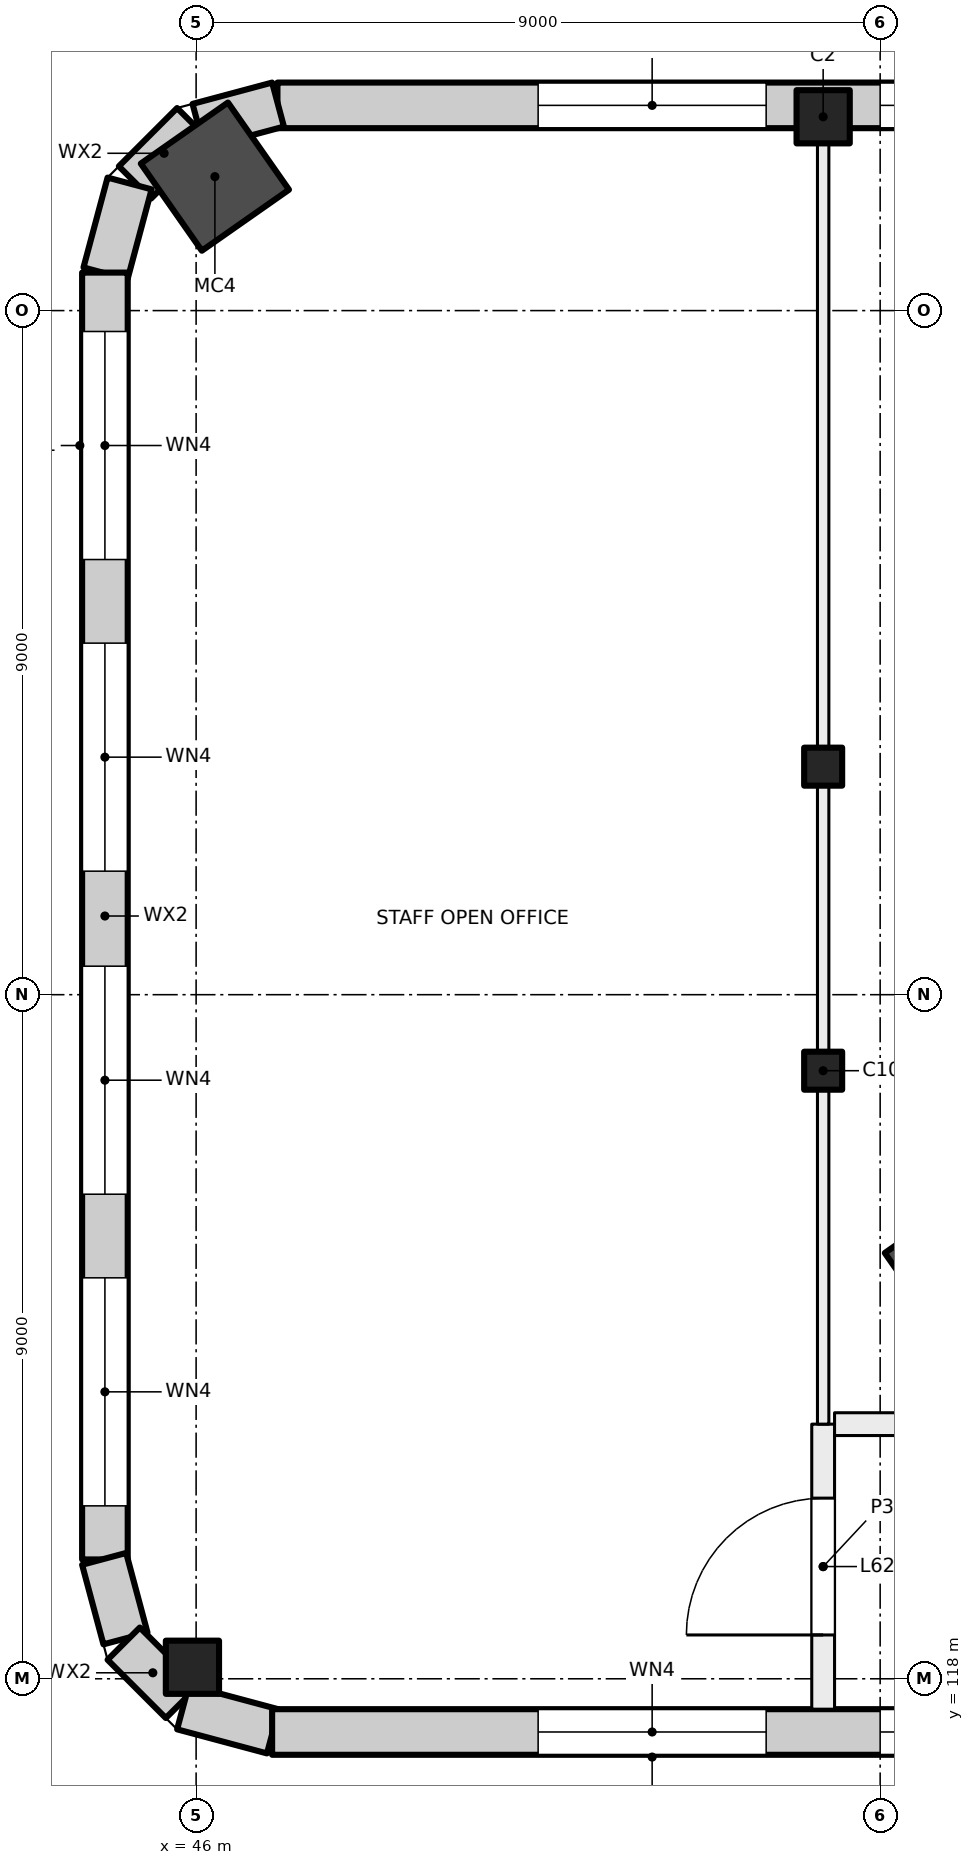
"""IFC4 building model, lengths in metres.
Left out: names, types, materials, properties, quantities, classifications, styles, units other than length and angle.
Written with IfcOpenShell. Run it as: python <this file> out.ifc"""

import sys

from ifc_helpers import new_model, si_unit, direction, frame, frame_2d, origin, origin_2d, place, context, subcontext, project, spatial, rectangle, hollow_rectangle, extrude, element, fill, save


model = new_model("IFC4")
c1 = context("Model", 3, precision=1e-05, world=origin(), true_north=direction((0.0, 1.0)))
c2 = subcontext(c1, "Body", "Model", "MODEL_VIEW")
j1 = project(units=[si_unit("LENGTHUNIT", "METRE"), si_unit("PLANEANGLEUNIT", "RADIAN")], contexts=[c1])
p1 = place(None, origin())
s1 = spatial("IfcSite", under=j1, at=p1, CompositionType="ELEMENT")
p2 = place(p1, origin())
s2 = spatial("IfcBuilding", under=s1, at=p2, CompositionType="ELEMENT")
p3 = place(p2, frame((0.0, 0.0, 261.5)))
s3 = spatial("IfcBuildingStorey", under=s2, at=p3, CompositionType="ELEMENT", Elevation=261.5)
for number, where, z_axis, x_axis in (
    (1, (46.247, 137.762, 0.0), (0.0, 0.0, 1.0), (0.574, -0.819, 0.0)),
    (2, (56.036, 123.43, 0.0), (0.0, 0.0, 1.0), (0.574, -0.819, 0.0)),
):
    element("IfcColumn", number, at=place(p3, frame(where, z_axis=z_axis, x_axis=x_axis)), inside=s3, PredefinedType="COLUMN", context=c2, shape_type="SweptSolid", body=[
        extrude(hollow_rectangle(XDim=1.4, YDim=1.4, WallThickness=0.025, at=origin_2d()), origin(), (0.0, 0.0, 1.0), 4.0),
    ])
for number, where, z_axis, x_axis in (
    (3, (54.25, 130.0, 0.0), (0.0, 0.0, 1.0), (1.0, 0.0, 0.0)),
    (4, (54.25, 126.0, 0.0), (0.0, 0.0, 1.0), (1.0, 0.0, 0.0)),
):
    element("IfcColumn", number, at=place(p3, frame(where, z_axis=z_axis, x_axis=x_axis)), inside=s3, PredefinedType="COLUMN", context=c2, shape_type="SweptSolid", body=[
        extrude(rectangle(XDim=0.5, YDim=0.5, at=origin_2d()), origin(), (0.0, 0.0, 1.0), 4.0),
    ])
for number, where, z_axis, x_axis in (
    (5, (54.25, 138.55, 0.0), (0.0, 0.0, 1.0), (1.0, 0.0, 0.0)),
    (6, (45.952, 118.152, 0.0), (0.0, 0.0, 1.0), (1.0, 0.0, 0.0)),
):
    element("IfcColumn", number, at=place(p3, frame(where, z_axis=z_axis, x_axis=x_axis)), inside=s3, PredefinedType="COLUMN", context=c2, shape_type="SweptSolid", body=[
        extrude(rectangle(XDim=0.7, YDim=0.7, at=origin_2d()), origin(), (0.0, 0.0, 1.0), 4.0),
    ])
p4 = place(p3, frame((47.07, 138.7, 0.0), z_axis=(0.0, 0.0, 1.0), x_axis=(1.0, 0.0, 0.0)))
e7 = element("IfcWall", 7, at=p4, inside=s3, PredefinedType="SOLIDWALL", context=c2, shape_type="SweptSolid", body=[
    extrude(rectangle(XDim=43.91, YDim=0.6, at=frame_2d((21.955, 0.0))), origin(), (0.0, 0.0, 1.0), 3.625),
])
p5 = place(p4, frame((3.43, 0.0, 0.9)))
e8 = element("IfcOpeningElement", 8, at=p5, cuts=e7, PredefinedType="OPENING", context=c2, shape_type="SweptSolid", body=[
    extrude(rectangle(XDim=3.0, YDim=2.4, at=frame_2d((1.5, 1.2))), frame((0.0, 0.31, 0.0), z_axis=(0.0, -1.0, 0.0), x_axis=(1.0, 0.0, 0.0)), (0.0, 0.0, 1.0), 0.62),
])
p6 = place(p4, frame((7.93, 0.0, 0.9)))
e9 = element("IfcOpeningElement", 9, at=p6, cuts=e7, PredefinedType="OPENING", context=c2, shape_type="SweptSolid", body=[
    extrude(rectangle(XDim=3.0, YDim=2.4, at=frame_2d((1.5, 1.2))), frame((0.0, 0.31, 0.0), z_axis=(0.0, -1.0, 0.0), x_axis=(1.0, 0.0, 0.0)), (0.0, 0.0, 1.0), 0.62),
])
p7 = place(p4, frame((12.43, 0.0, 0.9)))
e10 = element("IfcOpeningElement", 10, at=p7, cuts=e7, PredefinedType="OPENING", context=c2, shape_type="SweptSolid", body=[
    extrude(rectangle(XDim=3.0, YDim=2.4, at=frame_2d((1.5, 1.2))), frame((0.0, 0.31, 0.0), z_axis=(0.0, -1.0, 0.0), x_axis=(1.0, 0.0, 0.0)), (0.0, 0.0, 1.0), 0.62),
])
p8 = place(p4, frame((16.93, 0.0, 0.9)))
e11 = element("IfcOpeningElement", 11, at=p8, cuts=e7, PredefinedType="OPENING", context=c2, shape_type="SweptSolid", body=[
    extrude(rectangle(XDim=3.0, YDim=2.4, at=frame_2d((1.5, 1.2))), frame((0.0, 0.31, 0.0), z_axis=(0.0, -1.0, 0.0), x_axis=(1.0, 0.0, 0.0)), (0.0, 0.0, 1.0), 0.62),
])
p9 = place(p4, frame((21.43, 0.0, 0.9)))
e12 = element("IfcOpeningElement", 12, at=p9, cuts=e7, PredefinedType="OPENING", context=c2, shape_type="SweptSolid", body=[
    extrude(rectangle(XDim=3.0, YDim=2.4, at=frame_2d((1.5, 1.2))), frame((0.0, 0.31, 0.0), z_axis=(0.0, -1.0, 0.0), x_axis=(1.0, 0.0, 0.0)), (0.0, 0.0, 1.0), 0.62),
])
p10 = place(p4, frame((25.93, 0.0, 0.9)))
e13 = element("IfcOpeningElement", 13, at=p10, cuts=e7, PredefinedType="OPENING", context=c2, shape_type="SweptSolid", body=[
    extrude(rectangle(XDim=3.0, YDim=2.4, at=frame_2d((1.5, 1.2))), frame((0.0, 0.31, 0.0), z_axis=(0.0, -1.0, 0.0), x_axis=(1.0, 0.0, 0.0)), (0.0, 0.0, 1.0), 0.62),
])
p11 = place(p4, frame((30.43, 0.0, 0.9)))
e14 = element("IfcOpeningElement", 14, at=p11, cuts=e7, PredefinedType="OPENING", context=c2, shape_type="SweptSolid", body=[
    extrude(rectangle(XDim=3.0, YDim=2.4, at=frame_2d((1.5, 1.2))), frame((0.0, 0.31, 0.0), z_axis=(0.0, -1.0, 0.0), x_axis=(1.0, 0.0, 0.0)), (0.0, 0.0, 1.0), 0.62),
])
p12 = place(p4, frame((34.93, 0.0, 0.9)))
e15 = element("IfcOpeningElement", 15, at=p12, cuts=e7, PredefinedType="OPENING", context=c2, shape_type="SweptSolid", body=[
    extrude(rectangle(XDim=3.0, YDim=2.4, at=frame_2d((1.5, 1.2))), frame((0.0, 0.31, 0.0), z_axis=(0.0, -1.0, 0.0), x_axis=(1.0, 0.0, 0.0)), (0.0, 0.0, 1.0), 0.62),
])
p13 = place(p4, frame((39.43, 0.0, 0.9)))
e16 = element("IfcOpeningElement", 16, at=p13, cuts=e7, PredefinedType="OPENING", context=c2, shape_type="SweptSolid", body=[
    extrude(rectangle(XDim=3.0, YDim=2.4, at=frame_2d((1.5, 1.2))), frame((0.0, 0.31, 0.0), z_axis=(0.0, -1.0, 0.0), x_axis=(1.0, 0.0, 0.0)), (0.0, 0.0, 1.0), 0.62),
])
p14 = place(p3, frame((46.031, 138.43, 0.0), z_axis=(0.0, 0.0, 1.0), x_axis=(0.965939004864, 0.25876985698, 0.0)))
e17 = element("IfcWall", 17, at=p14, inside=s3, PredefinedType="SOLIDWALL", context=c2, shape_type="SweptSolid", body=[
    extrude(rectangle(XDim=1.084, YDim=0.6, at=frame_2d((0.542, 0.0))), origin(), (0.0, 0.0, 1.0), 3.625),
])
p15 = place(p3, frame((45.196, 137.686, 0.0), z_axis=(0.0, 0.0, 1.0), x_axis=(0.707106781187, 0.707106781187, 0.0)))
e18 = element("IfcWall", 18, at=p15, inside=s3, PredefinedType="SOLIDWALL", context=c2, shape_type="SweptSolid", body=[
    extrude(rectangle(XDim=1.084, YDim=0.6, at=frame_2d((0.542, 0.0))), origin(), (0.0, 0.0, 1.0), 3.625),
])
p16 = place(p3, frame((44.808, 136.49, 0.0), z_axis=(0.0, 0.0, 1.0), x_axis=(0.258878975098, 0.965909766102, 0.0)))
e19 = element("IfcWall", 19, at=p16, inside=s3, PredefinedType="SOLIDWALL", context=c2, shape_type="SweptSolid", body=[
    extrude(rectangle(XDim=1.224, YDim=0.6, at=frame_2d((0.612, 0.0))), origin(), (0.0, 0.0, 1.0), 3.625),
])
p17 = place(p3, frame((44.8, 119.57, 0.0), z_axis=(0.0, 0.0, 1.0), x_axis=(0.0, 1.0, 0.0)))
e20 = element("IfcWall", 20, at=p17, inside=s3, PredefinedType="SOLIDWALL", context=c2, shape_type="SweptSolid", body=[
    extrude(rectangle(XDim=16.93, YDim=0.6, at=frame_2d((8.465, 0.0))), origin(), (0.0, 0.0, 1.0), 3.625),
])
p18 = place(p17, frame((0.705, 0.0, 0.9)))
e21 = element("IfcOpeningElement", 21, at=p18, cuts=e20, PredefinedType="OPENING", context=c2, shape_type="SweptSolid", body=[
    extrude(rectangle(XDim=3.0, YDim=2.4, at=frame_2d((1.5, 1.2))), frame((0.0, 0.31, 0.0), z_axis=(0.0, -1.0, 0.0), x_axis=(1.0, 0.0, 0.0)), (0.0, 0.0, 1.0), 0.62),
])
p19 = place(p17, frame((4.805, 0.0, 0.9)))
e22 = element("IfcOpeningElement", 22, at=p19, cuts=e20, PredefinedType="OPENING", context=c2, shape_type="SweptSolid", body=[
    extrude(rectangle(XDim=3.0, YDim=2.4, at=frame_2d((1.5, 1.2))), frame((0.0, 0.31, 0.0), z_axis=(0.0, -1.0, 0.0), x_axis=(1.0, 0.0, 0.0)), (0.0, 0.0, 1.0), 0.62),
])
p20 = place(p17, frame((9.055, 0.0, 0.9)))
e23 = element("IfcOpeningElement", 23, at=p20, cuts=e20, PredefinedType="OPENING", context=c2, shape_type="SweptSolid", body=[
    extrude(rectangle(XDim=3.0, YDim=2.4, at=frame_2d((1.5, 1.2))), frame((0.0, 0.31, 0.0), z_axis=(0.0, -1.0, 0.0), x_axis=(1.0, 0.0, 0.0)), (0.0, 0.0, 1.0), 0.62),
])
p21 = place(p17, frame((13.155, 0.0, 0.9)))
e24 = element("IfcOpeningElement", 24, at=p21, cuts=e20, PredefinedType="OPENING", context=c2, shape_type="SweptSolid", body=[
    extrude(rectangle(XDim=3.0, YDim=2.4, at=frame_2d((1.5, 1.2))), frame((0.0, 0.31, 0.0), z_axis=(0.0, -1.0, 0.0), x_axis=(1.0, 0.0, 0.0)), (0.0, 0.0, 1.0), 0.62),
])
p22 = place(p3, frame((45.07, 118.531, 0.0), z_axis=(0.0, 0.0, 1.0), x_axis=(-0.25876985698, 0.965939004864, 0.0)))
e25 = element("IfcWall", 25, at=p22, inside=s3, PredefinedType="SOLIDWALL", context=c2, shape_type="SweptSolid", body=[
    extrude(rectangle(XDim=1.084, YDim=0.6, at=frame_2d((0.542, 0.0))), origin(), (0.0, 0.0, 1.0), 3.625),
])
p23 = place(p3, frame((45.814, 117.696, 0.0), z_axis=(0.0, 0.0, 1.0), x_axis=(-0.707106781187, 0.707106781187, 0.0)))
e26 = element("IfcWall", 26, at=p23, inside=s3, PredefinedType="SOLIDWALL", context=c2, shape_type="SweptSolid", body=[
    extrude(rectangle(XDim=1.084, YDim=0.6, at=frame_2d((0.542, 0.0))), origin(), (0.0, 0.0, 1.0), 3.625),
])
p24 = place(p3, frame((47.01, 117.308, 0.0), z_axis=(0.0, 0.0, 1.0), x_axis=(-0.965909766102, 0.258878975098, 0.0)))
e27 = element("IfcWall", 27, at=p24, inside=s3, PredefinedType="SOLIDWALL", context=c2, shape_type="SweptSolid", body=[
    extrude(rectangle(XDim=1.224, YDim=0.6, at=frame_2d((0.612, 0.0))), origin(), (0.0, 0.0, 1.0), 3.625),
])
p25 = place(p3, frame((90.98, 117.3, 0.0), z_axis=(0.0, 0.0, 1.0), x_axis=(-1.0, 0.0, 0.0)))
e28 = element("IfcWall", 28, at=p25, inside=s3, PredefinedType="SOLIDWALL", context=c2, shape_type="SweptSolid", body=[
    extrude(rectangle(XDim=43.98, YDim=0.6, at=frame_2d((21.99, 0.0))), origin(), (0.0, 0.0, 1.0), 3.625),
])
p26 = place(p25, frame((1.48, 0.0, 0.9)))
e29 = element("IfcOpeningElement", 29, at=p26, cuts=e28, PredefinedType="OPENING", context=c2, shape_type="SweptSolid", body=[
    extrude(rectangle(XDim=3.0, YDim=2.4, at=frame_2d((1.5, 1.2))), frame((0.0, 0.31, 0.0), z_axis=(0.0, -1.0, 0.0), x_axis=(1.0, 0.0, 0.0)), (0.0, 0.0, 1.0), 0.62),
])
p27 = place(p25, frame((5.98, 0.0, 0.9)))
e30 = element("IfcOpeningElement", 30, at=p27, cuts=e28, PredefinedType="OPENING", context=c2, shape_type="SweptSolid", body=[
    extrude(rectangle(XDim=3.0, YDim=2.4, at=frame_2d((1.5, 1.2))), frame((0.0, 0.31, 0.0), z_axis=(0.0, -1.0, 0.0), x_axis=(1.0, 0.0, 0.0)), (0.0, 0.0, 1.0), 0.62),
])
p28 = place(p25, frame((10.48, 0.0, 0.9)))
e31 = element("IfcOpeningElement", 31, at=p28, cuts=e28, PredefinedType="OPENING", context=c2, shape_type="SweptSolid", body=[
    extrude(rectangle(XDim=3.0, YDim=2.4, at=frame_2d((1.5, 1.2))), frame((0.0, 0.31, 0.0), z_axis=(0.0, -1.0, 0.0), x_axis=(1.0, 0.0, 0.0)), (0.0, 0.0, 1.0), 0.62),
])
p29 = place(p25, frame((14.98, 0.0, 0.9)))
e32 = element("IfcOpeningElement", 32, at=p29, cuts=e28, PredefinedType="OPENING", context=c2, shape_type="SweptSolid", body=[
    extrude(rectangle(XDim=3.0, YDim=2.4, at=frame_2d((1.5, 1.2))), frame((0.0, 0.31, 0.0), z_axis=(0.0, -1.0, 0.0), x_axis=(1.0, 0.0, 0.0)), (0.0, 0.0, 1.0), 0.62),
])
p30 = place(p25, frame((19.48, 0.0, 0.9)))
e33 = element("IfcOpeningElement", 33, at=p30, cuts=e28, PredefinedType="OPENING", context=c2, shape_type="SweptSolid", body=[
    extrude(rectangle(XDim=3.0, YDim=2.4, at=frame_2d((1.5, 1.2))), frame((0.0, 0.31, 0.0), z_axis=(0.0, -1.0, 0.0), x_axis=(1.0, 0.0, 0.0)), (0.0, 0.0, 1.0), 0.62),
])
p31 = place(p25, frame((23.98, 0.0, 0.9)))
e34 = element("IfcOpeningElement", 34, at=p31, cuts=e28, PredefinedType="OPENING", context=c2, shape_type="SweptSolid", body=[
    extrude(rectangle(XDim=3.0, YDim=2.4, at=frame_2d((1.5, 1.2))), frame((0.0, 0.31, 0.0), z_axis=(0.0, -1.0, 0.0), x_axis=(1.0, 0.0, 0.0)), (0.0, 0.0, 1.0), 0.62),
])
p32 = place(p25, frame((28.48, 0.0, 0.9)))
e35 = element("IfcOpeningElement", 35, at=p32, cuts=e28, PredefinedType="OPENING", context=c2, shape_type="SweptSolid", body=[
    extrude(rectangle(XDim=3.0, YDim=2.4, at=frame_2d((1.5, 1.2))), frame((0.0, 0.31, 0.0), z_axis=(0.0, -1.0, 0.0), x_axis=(1.0, 0.0, 0.0)), (0.0, 0.0, 1.0), 0.62),
])
p33 = place(p25, frame((32.98, 0.0, 0.9)))
e36 = element("IfcOpeningElement", 36, at=p33, cuts=e28, PredefinedType="OPENING", context=c2, shape_type="SweptSolid", body=[
    extrude(rectangle(XDim=3.0, YDim=2.4, at=frame_2d((1.5, 1.2))), frame((0.0, 0.31, 0.0), z_axis=(0.0, -1.0, 0.0), x_axis=(1.0, 0.0, 0.0)), (0.0, 0.0, 1.0), 0.62),
])
p34 = place(p25, frame((37.48, 0.0, 0.9)))
e37 = element("IfcOpeningElement", 37, at=p34, cuts=e28, PredefinedType="OPENING", context=c2, shape_type="SweptSolid", body=[
    extrude(rectangle(XDim=3.0, YDim=2.4, at=frame_2d((1.5, 1.2))), frame((0.0, 0.31, 0.0), z_axis=(0.0, -1.0, 0.0), x_axis=(1.0, 0.0, 0.0)), (0.0, 0.0, 1.0), 0.62),
])
p35 = place(p3, frame((54.25, 117.6, 0.0), z_axis=(0.0, 0.0, 1.0), x_axis=(0.0, 1.0, 0.0)))
e38 = element("IfcWall", 38, at=p35, inside=s3, PredefinedType="PARTITIONING", context=c2, shape_type="SweptSolid", body=[
    extrude(rectangle(XDim=3.75, YDim=0.3, at=frame_2d((1.875, 0.0))), origin(), (0.0, 0.0, 1.0), 3.625),
])
p36 = place(p35, frame((0.977, 0.0, 0.0)))
e39 = element("IfcOpeningElement", 39, at=p36, cuts=e38, PredefinedType="OPENING", context=c2, shape_type="SweptSolid", body=[
    extrude(rectangle(XDim=1.8, YDim=2.1, at=frame_2d((0.9, 1.05))), frame((0.0, 0.16, 0.0), z_axis=(0.0, -1.0, 0.0), x_axis=(1.0, 0.0, 0.0)), (0.0, 0.0, 1.0), 0.32),
])
p37 = place(p3, frame((54.4, 121.35, 0.0), z_axis=(0.0, 0.0, 1.0), x_axis=(1.0, 0.0, 0.0)))
e40 = element("IfcWall", 40, at=p37, inside=s3, PredefinedType="PARTITIONING", context=c2, shape_type="SweptSolid", body=[
    extrude(rectangle(XDim=31.438, YDim=0.3, at=frame_2d((15.719, 0.0))), origin(), (0.0, 0.0, 1.0), 3.625),
])
p38 = place(p37, frame((21.85, 0.0, 0.0)))
e41 = element("IfcOpeningElement", 41, at=p38, cuts=e40, PredefinedType="OPENING", context=c2, shape_type="SweptSolid", body=[
    extrude(rectangle(XDim=1.0, YDim=2.1, at=frame_2d((0.5, 1.05))), frame((0.0, 0.16, 0.0), z_axis=(0.0, -1.0, 0.0), x_axis=(1.0, 0.0, 0.0)), (0.0, 0.0, 1.0), 0.32),
])
p39 = place(p37, frame((12.75, 0.0, 0.0)))
e42 = element("IfcOpeningElement", 42, at=p39, cuts=e40, PredefinedType="OPENING", context=c2, shape_type="SweptSolid", body=[
    extrude(rectangle(XDim=1.2, YDim=2.1, at=frame_2d((0.6, 1.05))), frame((0.0, 0.16, 0.0), z_axis=(0.0, -1.0, 0.0), x_axis=(1.0, 0.0, 0.0)), (0.0, 0.0, 1.0), 0.32),
])
p40 = place(p37, frame((3.515, 0.0, 0.0)))
e43 = element("IfcOpeningElement", 43, at=p40, cuts=e40, PredefinedType="OPENING", context=c2, shape_type="SweptSolid", body=[
    extrude(rectangle(XDim=1.8, YDim=2.1, at=frame_2d((0.9, 1.05))), frame((0.0, 0.16, 0.0), z_axis=(0.0, -1.0, 0.0), x_axis=(1.0, 0.0, 0.0)), (0.0, 0.0, 1.0), 0.32),
])
p41 = place(p3, frame((54.25, 138.4, 0.0), z_axis=(0.0, 0.0, 1.0), x_axis=(0.0, -1.0, 0.0)))
e44 = element("IfcWall", 44, at=p41, inside=s3, PredefinedType="PARTITIONING", context=c2, shape_type="SweptSolid", body=[
    extrude(rectangle(XDim=17.05, YDim=0.15, at=frame_2d((8.525, 0.0))), origin(), (0.0, 0.0, 1.0), 3.625),
])
p42 = place(p5, origin())
e45 = element("IfcWindow", 45, at=p42, inside=s3, PartitioningType="SINGLE_PANEL", PredefinedType="WINDOW", context=c2, shape_type="SweptSolid", body=[
    extrude(rectangle(XDim=3.0, YDim=2.4, at=frame_2d((1.5, 1.2))), frame((0.0, 0.03, 0.0), z_axis=(0.0, -1.0, 0.0), x_axis=(1.0, 0.0, 0.0)), (0.0, 0.0, 1.0), 0.06),
])
fill(e8, e45)
p43 = place(p6, origin())
e46 = element("IfcWindow", 46, at=p43, inside=s3, PartitioningType="SINGLE_PANEL", PredefinedType="WINDOW", context=c2, shape_type="SweptSolid", body=[
    extrude(rectangle(XDim=3.0, YDim=2.4, at=frame_2d((1.5, 1.2))), frame((0.0, 0.03, 0.0), z_axis=(0.0, -1.0, 0.0), x_axis=(1.0, 0.0, 0.0)), (0.0, 0.0, 1.0), 0.06),
])
fill(e9, e46)
p44 = place(p18, origin())
e47 = element("IfcWindow", 47, at=p44, inside=s3, PartitioningType="SINGLE_PANEL", PredefinedType="WINDOW", context=c2, shape_type="SweptSolid", body=[
    extrude(rectangle(XDim=3.0, YDim=2.4, at=frame_2d((1.5, 1.2))), frame((0.0, 0.03, 0.0), z_axis=(0.0, -1.0, 0.0), x_axis=(1.0, 0.0, 0.0)), (0.0, 0.0, 1.0), 0.06),
])
fill(e21, e47)
p45 = place(p19, origin())
e48 = element("IfcWindow", 48, at=p45, inside=s3, PartitioningType="SINGLE_PANEL", PredefinedType="WINDOW", context=c2, shape_type="SweptSolid", body=[
    extrude(rectangle(XDim=3.0, YDim=2.4, at=frame_2d((1.5, 1.2))), frame((0.0, 0.03, 0.0), z_axis=(0.0, -1.0, 0.0), x_axis=(1.0, 0.0, 0.0)), (0.0, 0.0, 1.0), 0.06),
])
fill(e22, e48)
p46 = place(p20, origin())
e49 = element("IfcWindow", 49, at=p46, inside=s3, PartitioningType="SINGLE_PANEL", PredefinedType="WINDOW", context=c2, shape_type="SweptSolid", body=[
    extrude(rectangle(XDim=3.0, YDim=2.4, at=frame_2d((1.5, 1.2))), frame((0.0, 0.03, 0.0), z_axis=(0.0, -1.0, 0.0), x_axis=(1.0, 0.0, 0.0)), (0.0, 0.0, 1.0), 0.06),
])
fill(e23, e49)
p47 = place(p21, origin())
e50 = element("IfcWindow", 50, at=p47, inside=s3, PartitioningType="SINGLE_PANEL", PredefinedType="WINDOW", context=c2, shape_type="SweptSolid", body=[
    extrude(rectangle(XDim=3.0, YDim=2.4, at=frame_2d((1.5, 1.2))), frame((0.0, 0.03, 0.0), z_axis=(0.0, -1.0, 0.0), x_axis=(1.0, 0.0, 0.0)), (0.0, 0.0, 1.0), 0.06),
])
fill(e24, e50)
p48 = place(p33, origin())
e51 = element("IfcWindow", 51, at=p48, inside=s3, PartitioningType="SINGLE_PANEL", PredefinedType="WINDOW", context=c2, shape_type="SweptSolid", body=[
    extrude(rectangle(XDim=3.0, YDim=2.4, at=frame_2d((1.5, 1.2))), frame((0.0, 0.03, 0.0), z_axis=(0.0, -1.0, 0.0), x_axis=(1.0, 0.0, 0.0)), (0.0, 0.0, 1.0), 0.06),
])
fill(e36, e51)
p49 = place(p34, origin())
e52 = element("IfcWindow", 52, at=p49, inside=s3, PartitioningType="SINGLE_PANEL", PredefinedType="WINDOW", context=c2, shape_type="SweptSolid", body=[
    extrude(rectangle(XDim=3.0, YDim=2.4, at=frame_2d((1.5, 1.2))), frame((0.0, 0.03, 0.0), z_axis=(0.0, -1.0, 0.0), x_axis=(1.0, 0.0, 0.0)), (0.0, 0.0, 1.0), 0.06),
])
fill(e37, e52)
p50 = place(p36, origin())
e53 = element("IfcDoor", 53, at=p50, inside=s3, OperationType="DOUBLE_DOOR_SINGLE_SWING", PredefinedType="DOOR", context=c2, shape_type="SweptSolid", body=[
    extrude(rectangle(XDim=1.8, YDim=2.1, at=frame_2d((0.9, 1.05))), frame((0.0, 0.025, 0.0), z_axis=(0.0, -1.0, 0.0), x_axis=(1.0, 0.0, 0.0)), (0.0, 0.0, 1.0), 0.05),
])
fill(e39, e53)
save(model, sys.argv[1])
